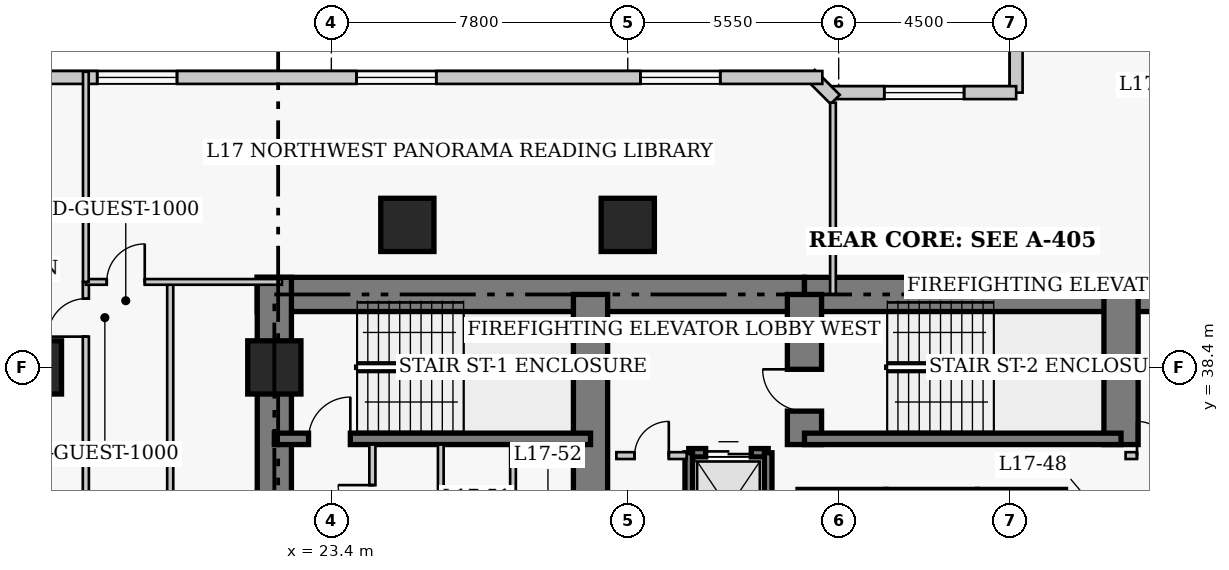
"""IFC4 building model, lengths in metres.
Left out: names, types, materials, properties, quantities, classifications, styles, units other than length and angle.
Written with IfcOpenShell. Run it as: python <this file> out.ifc"""

import sys

from ifc_helpers import new_model, si_unit, direction, frame, frame_2d, origin, origin_2d, place, context, subcontext, project, spatial, rectangle, extrude, element, fill, save


model = new_model("IFC4")
c1 = context("Model", 3, precision=1e-05, world=origin(), true_north=direction((0.0, 1.0)))
c2 = subcontext(c1, "Body", "Model", "MODEL_VIEW")
j1 = project(units=[si_unit("LENGTHUNIT", "METRE"), si_unit("PLANEANGLEUNIT", "RADIAN")], contexts=[c1])
p1 = place(None, origin())
s1 = spatial("IfcSite", under=j1, at=p1, CompositionType="ELEMENT")
p2 = place(p1, origin())
s2 = spatial("IfcBuilding", under=s1, at=p2, CompositionType="ELEMENT")
p3 = place(p2, frame((0.0, 0.0, 71.6)))
s3 = spatial("IfcBuildingStorey", under=s2, at=p3, CompositionType="ELEMENT", Elevation=71.6)
p4 = place(p3, frame((21.45, 40.32, 0.0), z_axis=(0.0, 0.0, 1.0), x_axis=(1.0, 0.0, 0.0)))
e1 = element("IfcWall", 1, at=p4, inside=s3, PredefinedType="SHEAR", context=c2, shape_type="SweptSolid", body=[
    extrude(rectangle(XDim=14.4, YDim=0.9, at=frame_2d((7.2, 0.0))), origin(), (0.0, 0.0, 1.0), 3.8),
])
p5 = place(p3, frame((35.85, 40.32, 0.0), z_axis=(0.0, 0.0, 1.0), x_axis=(1.0, 0.0, 0.0)))
e2 = element("IfcWall", 2, at=p5, inside=s3, PredefinedType="SHEAR", context=c2, shape_type="SweptSolid", body=[
    extrude(rectangle(XDim=12.6, YDim=0.9, at=frame_2d((6.3, 0.0))), origin(), (0.0, 0.0, 1.0), 3.8),
])
p6 = place(p3, frame((21.9, 27.05, 0.0), z_axis=(0.0, 0.0, 1.0), x_axis=(0.0, 1.0, 0.0)))
e3 = element("IfcWall", 3, at=p6, inside=s3, PredefinedType="SHEAR", context=c2, shape_type="SweptSolid", body=[
    extrude(rectangle(XDim=13.72, YDim=0.9, at=frame_2d((6.86, 0.0))), origin(), (0.0, 0.0, 1.0), 3.8),
])
p7 = place(p3, frame((30.22, 33.2, 0.0), z_axis=(0.0, 0.0, 1.0), x_axis=(0.0, 1.0, 0.0)))
e4 = element("IfcWall", 4, at=p7, inside=s3, PredefinedType="SHEAR", context=c2, shape_type="SweptSolid", body=[
    extrude(rectangle(XDim=7.12, YDim=0.9, at=frame_2d((3.56, 0.0))), origin(), (0.0, 0.0, 1.0), 3.8),
])
p8 = place(p3, frame((35.85, 36.37, 0.0), z_axis=(0.0, 0.0, 1.0), x_axis=(0.0, 1.0, 0.0)))
e5 = element("IfcWall", 5, at=p8, inside=s3, PredefinedType="SHEAR", context=c2, shape_type="SweptSolid", body=[
    extrude(rectangle(XDim=3.95, YDim=0.9, at=frame_2d((1.975, 0.0))), origin(), (0.0, 0.0, 1.0), 3.8),
])
p9 = place(p8, frame((0.88, 0.0, 0.0)))
e6 = element("IfcOpeningElement", 6, at=p9, cuts=e5, PredefinedType="OPENING", context=c2, shape_type="SweptSolid", body=[
    extrude(rectangle(XDim=1.1, YDim=2.15, at=frame_2d((0.55, 1.075))), frame((0.0, 0.46, 0.0), z_axis=(0.0, -1.0, 0.0), x_axis=(1.0, 0.0, 0.0)), (0.0, 0.0, 1.0), 0.92),
])
p10 = place(p3, frame((44.18, 36.37, 0.0), z_axis=(0.0, 0.0, 1.0), x_axis=(0.0, 1.0, 0.0)))
e7 = element("IfcWall", 7, at=p10, inside=s3, PredefinedType="SHEAR", context=c2, shape_type="SweptSolid", body=[
    extrude(rectangle(XDim=3.95, YDim=0.9, at=frame_2d((1.975, 0.0))), origin(), (0.0, 0.0, 1.0), 3.8),
])
p11 = place(p3, frame((21.9, 36.52, 0.0), z_axis=(0.0, 0.0, 1.0), x_axis=(1.0, 0.0, 0.0)))
e8 = element("IfcWall", 8, at=p11, inside=s3, PredefinedType="SHEAR", context=c2, shape_type="SweptSolid", body=[
    extrude(rectangle(XDim=8.32, YDim=0.3, at=frame_2d((4.16, 0.0))), origin(), (0.0, 0.0, 1.0), 3.8),
])
p12 = place(p11, frame((0.9, 0.0, 0.0)))
e9 = element("IfcOpeningElement", 9, at=p12, cuts=e8, PredefinedType="OPENING", context=c2, shape_type="SweptSolid", body=[
    extrude(rectangle(XDim=1.1, YDim=2.15, at=frame_2d((0.55, 1.075))), frame((0.0, 0.16, 0.0), z_axis=(0.0, -1.0, 0.0), x_axis=(1.0, 0.0, 0.0)), (0.0, 0.0, 1.0), 0.32),
])
p13 = place(p3, frame((35.85, 36.52, 0.0), z_axis=(0.0, 0.0, 1.0), x_axis=(1.0, 0.0, 0.0)))
e10 = element("IfcWall", 10, at=p13, inside=s3, PredefinedType="SHEAR", context=c2, shape_type="SweptSolid", body=[
    extrude(rectangle(XDim=8.33, YDim=0.3, at=frame_2d((4.165, 0.0))), origin(), (0.0, 0.0, 1.0), 3.8),
])
for number, where, z_axis, x_axis in (
    (11, (15.6, 38.4, 0.0), (0.0, 0.0, 1.0), (1.0, 0.0, 0.0)),
    (12, (21.9, 38.4, 0.0), (0.0, 0.0, 1.0), (1.0, 0.0, 0.0)),
    (13, (25.4, 42.15, 0.0), (0.0, 0.0, 1.0), (1.0, 0.0, 0.0)),
    (14, (31.2, 42.15, 0.0), (0.0, 0.0, 1.0), (1.0, 0.0, 0.0)),
):
    element("IfcColumn", number, at=place(p3, frame(where, z_axis=z_axis, x_axis=x_axis)), inside=s3, PredefinedType="COLUMN", context=c2, shape_type="SweptSolid", body=[
        extrude(rectangle(XDim=1.4, YDim=1.4, at=origin_2d()), origin(), (0.0, 0.0, 1.0), 3.8),
    ])
p14 = place(p3, frame((41.42, 50.97, 0.0), z_axis=(0.0, 0.0, 1.0), x_axis=(0.0, -1.0, 0.0)))
e15 = element("IfcWall", 15, at=p14, inside=s3, PredefinedType="SOLIDWALL", context=c2, shape_type="SweptSolid", body=[
    extrude(rectangle(XDim=5.34, YDim=0.34, at=frame_2d((2.67, 0.0))), origin(), (0.0, 0.0, 1.0), 3.42),
])
p15 = place(p14, frame((1.62, 0.0, 0.85)))
e16 = element("IfcOpeningElement", 16, at=p15, cuts=e15, PredefinedType="OPENING", context=c2, shape_type="SweptSolid", body=[
    extrude(rectangle(XDim=2.1, YDim=1.85, at=frame_2d((1.05, 0.925))), frame((0.0, 0.18, 0.0), z_axis=(0.0, -1.0, 0.0), x_axis=(1.0, 0.0, 0.0)), (0.0, 0.0, 1.0), 0.36),
])
p16 = place(p3, frame((41.42, 45.63, 0.0), z_axis=(0.0, 0.0, 1.0), x_axis=(-1.0, 0.0, 0.0)))
e17 = element("IfcWall", 17, at=p16, inside=s3, PredefinedType="SOLIDWALL", context=c2, shape_type="SweptSolid", body=[
    extrude(rectangle(XDim=4.84, YDim=0.34, at=frame_2d((2.42, 0.0))), origin(), (0.0, 0.0, 1.0), 3.42),
])
p17 = place(p16, frame((1.37, 0.0, 0.85)))
e18 = element("IfcOpeningElement", 18, at=p17, cuts=e17, PredefinedType="OPENING", context=c2, shape_type="SweptSolid", body=[
    extrude(rectangle(XDim=2.1, YDim=1.85, at=frame_2d((1.05, 0.925))), frame((0.0, 0.18, 0.0), z_axis=(0.0, -1.0, 0.0), x_axis=(1.0, 0.0, 0.0)), (0.0, 0.0, 1.0), 0.36),
])
p18 = place(p3, frame((36.658, 45.451, 0.0), z_axis=(0.0, 0.0, 1.0), x_axis=(-0.707106781187, 0.707106781187, 0.0)))
e19 = element("IfcWall", 19, at=p18, inside=s3, PredefinedType="SOLIDWALL", context=c2, shape_type="SweptSolid", body=[
    extrude(rectangle(XDim=0.929, YDim=0.34, at=frame_2d((0.464, 0.0))), origin(), (0.0, 0.0, 1.0), 3.42),
])
p19 = place(p3, frame((36.32, 46.03, 0.0), z_axis=(0.0, 0.0, 1.0), x_axis=(-1.0, 0.0, 0.0)))
e20 = element("IfcWall", 20, at=p19, inside=s3, PredefinedType="SOLIDWALL", context=c2, shape_type="SweptSolid", body=[
    extrude(rectangle(XDim=29.89, YDim=0.34, at=frame_2d((14.945, 0.0))), origin(), (0.0, 0.0, 1.0), 3.42),
])
p20 = place(p19, frame((2.686, 0.0, 0.85)))
e21 = element("IfcOpeningElement", 21, at=p20, cuts=e20, PredefinedType="OPENING", context=c2, shape_type="SweptSolid", body=[
    extrude(rectangle(XDim=2.1, YDim=1.85, at=frame_2d((1.05, 0.925))), frame((0.0, 0.18, 0.0), z_axis=(0.0, -1.0, 0.0), x_axis=(1.0, 0.0, 0.0)), (0.0, 0.0, 1.0), 0.36),
])
p21 = place(p19, frame((10.159, 0.0, 0.85)))
e22 = element("IfcOpeningElement", 22, at=p21, cuts=e20, PredefinedType="OPENING", context=c2, shape_type="SweptSolid", body=[
    extrude(rectangle(XDim=2.1, YDim=1.85, at=frame_2d((1.05, 0.925))), frame((0.0, 0.18, 0.0), z_axis=(0.0, -1.0, 0.0), x_axis=(1.0, 0.0, 0.0)), (0.0, 0.0, 1.0), 0.36),
])
p22 = place(p19, frame((16.981, 0.0, 0.85)))
e23 = element("IfcOpeningElement", 23, at=p22, cuts=e20, PredefinedType="OPENING", context=c2, shape_type="SweptSolid", body=[
    extrude(rectangle(XDim=2.1, YDim=1.85, at=frame_2d((1.05, 0.925))), frame((0.0, 0.18, 0.0), z_axis=(0.0, -1.0, 0.0), x_axis=(1.0, 0.0, 0.0)), (0.0, 0.0, 1.0), 0.36),
])
p23 = place(p19, frame((25.104, 0.0, 0.85)))
e24 = element("IfcOpeningElement", 24, at=p23, cuts=e20, PredefinedType="OPENING", context=c2, shape_type="SweptSolid", body=[
    extrude(rectangle(XDim=2.1, YDim=1.85, at=frame_2d((1.05, 0.925))), frame((0.0, 0.18, 0.0), z_axis=(0.0, -1.0, 0.0), x_axis=(1.0, 0.0, 0.0)), (0.0, 0.0, 1.0), 0.36),
])
p24 = place(p3, frame((35.68, 35.08, 0.0), z_axis=(0.0, 0.0, 1.0), x_axis=(1.0, 0.0, 0.0)))
e25 = element("IfcWall", 25, at=p24, inside=s3, PredefinedType="SHEAR", context=c2, shape_type="SweptSolid", body=[
    extrude(rectangle(XDim=2.32, YDim=0.22, at=frame_2d((1.16, 0.0))), origin(), (0.0, 0.0, 1.0), 3.8),
])
p25 = place(p3, frame((38.0, 35.08, 0.0), z_axis=(0.0, 0.0, 1.0), x_axis=(1.0, 0.0, 0.0)))
e26 = element("IfcWall", 26, at=p25, inside=s3, PredefinedType="SHEAR", context=c2, shape_type="SweptSolid", body=[
    extrude(rectangle(XDim=2.4, YDim=0.22, at=frame_2d((1.2, 0.0))), origin(), (0.0, 0.0, 1.0), 3.8),
])
p26 = place(p3, frame((40.4, 35.08, 0.0), z_axis=(0.0, 0.0, 1.0), x_axis=(1.0, 0.0, 0.0)))
e27 = element("IfcWall", 27, at=p26, inside=s3, PredefinedType="SHEAR", context=c2, shape_type="SweptSolid", body=[
    extrude(rectangle(XDim=2.32, YDim=0.22, at=frame_2d((1.16, 0.0))), origin(), (0.0, 0.0, 1.0), 3.8),
])
p27 = place(p3, frame((32.805, 36.155, 0.0), z_axis=(0.0, 0.0, 1.0), x_axis=(1.0, 0.0, 0.0)))
e28 = element("IfcWall", 28, at=p27, inside=s3, PredefinedType="SHEAR", context=c2, shape_type="SweptSolid", body=[
    extrude(rectangle(XDim=2.09, YDim=0.22, at=frame_2d((1.045, 0.0))), origin(), (0.0, 0.0, 1.0), 3.8),
])
p28 = place(p27, frame((0.445, 0.0, 0.0)))
e29 = element("IfcOpeningElement", 29, at=p28, cuts=e28, PredefinedType="OPENING", context=c2, shape_type="SweptSolid", body=[
    extrude(rectangle(XDim=1.2, YDim=2.15, at=frame_2d((0.6, 1.075))), frame((0.0, 0.12, 0.0), z_axis=(0.0, -1.0, 0.0), x_axis=(1.0, 0.0, 0.0)), (0.0, 0.0, 1.0), 0.24),
])
for number, where, z_axis, x_axis in (
    (30, (32.805, 33.245, 0.0), (0.0, 0.0, 1.0), (0.0, 1.0, 0.0)),
    (31, (34.895, 33.245, 0.0), (0.0, 0.0, 1.0), (0.0, 1.0, 0.0)),
):
    element("IfcWall", number, at=place(p3, frame(where, z_axis=z_axis, x_axis=x_axis)), inside=s3, PredefinedType="SHEAR", context=c2, shape_type="SweptSolid", body=[
        extrude(rectangle(XDim=2.91, YDim=0.2, at=frame_2d((1.455, 0.0))), origin(), (0.0, 0.0, 1.0), 3.8),
    ])
p29 = place(p3, frame((30.9, 36.08, 0.0), z_axis=(0.0, 0.0, 1.0), x_axis=(1.0, 0.0, 0.0)))
e32 = element("IfcWall", 32, at=p29, inside=s3, PredefinedType="PARTITIONING", context=c2, shape_type="SweptSolid", body=[
    extrude(rectangle(XDim=1.85, YDim=0.18, at=frame_2d((0.925, 0.0))), origin(), (0.0, 0.0, 1.0), 3.42),
])
p30 = place(p29, frame((0.48, 0.0, 0.0)))
e33 = element("IfcOpeningElement", 33, at=p30, cuts=e32, PredefinedType="OPENING", context=c2, shape_type="SweptSolid", body=[
    extrude(rectangle(XDim=0.9, YDim=2.15, at=frame_2d((0.45, 1.075))), frame((0.0, 0.1, 0.0), z_axis=(0.0, -1.0, 0.0), x_axis=(1.0, 0.0, 0.0)), (0.0, 0.0, 1.0), 0.2),
])
p31 = place(p3, frame((44.3, 36.08, 0.0), z_axis=(0.0, 0.0, 1.0), x_axis=(1.0, 0.0, 0.0)))
e34 = element("IfcWall", 34, at=p31, inside=s3, PredefinedType="PARTITIONING", context=c2, shape_type="SweptSolid", body=[
    extrude(rectangle(XDim=1.5, YDim=0.18, at=frame_2d((0.75, 0.0))), origin(), (0.0, 0.0, 1.0), 3.42),
])
p32 = place(p31, frame((0.3, 0.0, 0.0)))
e35 = element("IfcOpeningElement", 35, at=p32, cuts=e34, PredefinedType="OPENING", context=c2, shape_type="SweptSolid", body=[
    extrude(rectangle(XDim=0.9, YDim=2.15, at=frame_2d((0.45, 1.075))), frame((0.0, 0.1, 0.0), z_axis=(0.0, -1.0, 0.0), x_axis=(1.0, 0.0, 0.0)), (0.0, 0.0, 1.0), 0.2),
])
p33 = place(p3, frame((24.48, 32.8, 0.0), z_axis=(0.0, 0.0, 1.0), x_axis=(0.0, 1.0, 0.0)))
e36 = element("IfcWall", 36, at=p33, inside=s3, PredefinedType="PARTITIONING", context=c2, shape_type="SweptSolid", body=[
    extrude(rectangle(XDim=3.57, YDim=0.16, at=frame_2d((1.785, 0.0))), origin(), (0.0, 0.0, 1.0), 3.42),
])
p34 = place(p33, frame((1.604, 0.0, 0.0)))
e37 = element("IfcOpeningElement", 37, at=p34, cuts=e36, PredefinedType="OPENING", context=c2, shape_type="SweptSolid", body=[
    extrude(rectangle(XDim=0.9, YDim=2.1, at=frame_2d((0.45, 1.05))), frame((0.0, 0.09, 0.0), z_axis=(0.0, -1.0, 0.0), x_axis=(1.0, 0.0, 0.0)), (0.0, 0.0, 1.0), 0.18),
])
for number, where, z_axis, x_axis in (
    (38, (26.28, 32.75, 0.0), (0.0, 0.0, 1.0), (0.0, 1.0, 0.0)),
    (39, (28.18, 32.75, 0.0), (0.0, 0.0, 1.0), (0.0, 1.0, 0.0)),
):
    element("IfcWall", number, at=place(p3, frame(where, z_axis=z_axis, x_axis=x_axis)), inside=s3, PredefinedType="PARTITIONING", context=c2, shape_type="SweptSolid", body=[
        extrude(rectangle(XDim=3.62, YDim=0.15, at=frame_2d((1.81, 0.0))), origin(), (0.0, 0.0, 1.0), 3.42),
    ])
p35 = place(p3, frame((16.94, 5.05, 0.0), z_axis=(0.0, 0.0, 1.0), x_axis=(0.0, 1.0, 0.0)))
e40 = element("IfcWall", 40, at=p35, inside=s3, PredefinedType="PARTITIONING", context=c2, shape_type="SweptSolid", body=[
    extrude(rectangle(XDim=35.6, YDim=0.16, at=frame_2d((17.8, 0.0))), origin(), (0.0, 0.0, 1.0), 3.42),
])
p36 = place(p35, frame((2.6, 0.0, 0.0)))
e41 = element("IfcOpeningElement", 41, at=p36, cuts=e40, PredefinedType="OPENING", context=c2, shape_type="SweptSolid", body=[
    extrude(rectangle(XDim=0.95, YDim=2.1, at=frame_2d((0.475, 1.05))), frame((0.0, 0.09, 0.0), z_axis=(0.0, -1.0, 0.0), x_axis=(1.0, 0.0, 0.0)), (0.0, 0.0, 1.0), 0.18),
])
p37 = place(p35, frame((10.075, 0.0, 0.0)))
e42 = element("IfcOpeningElement", 42, at=p37, cuts=e40, PredefinedType="OPENING", context=c2, shape_type="SweptSolid", body=[
    extrude(rectangle(XDim=0.95, YDim=2.1, at=frame_2d((0.475, 1.05))), frame((0.0, 0.09, 0.0), z_axis=(0.0, -1.0, 0.0), x_axis=(1.0, 0.0, 0.0)), (0.0, 0.0, 1.0), 0.18),
])
p38 = place(p35, frame((18.875, 0.0, 0.0)))
e43 = element("IfcOpeningElement", 43, at=p38, cuts=e40, PredefinedType="OPENING", context=c2, shape_type="SweptSolid", body=[
    extrude(rectangle(XDim=0.95, YDim=2.1, at=frame_2d((0.475, 1.05))), frame((0.0, 0.09, 0.0), z_axis=(0.0, -1.0, 0.0), x_axis=(1.0, 0.0, 0.0)), (0.0, 0.0, 1.0), 0.18),
])
p39 = place(p35, frame((26.925, 0.0, 0.0)))
e44 = element("IfcOpeningElement", 44, at=p39, cuts=e40, PredefinedType="OPENING", context=c2, shape_type="SweptSolid", body=[
    extrude(rectangle(XDim=0.95, YDim=2.1, at=frame_2d((0.475, 1.05))), frame((0.0, 0.09, 0.0), z_axis=(0.0, -1.0, 0.0), x_axis=(1.0, 0.0, 0.0)), (0.0, 0.0, 1.0), 0.18),
])
p40 = place(p35, frame((34.16, 0.0, 0.0)))
e45 = element("IfcOpeningElement", 45, at=p40, cuts=e40, PredefinedType="OPENING", context=c2, shape_type="SweptSolid", body=[
    extrude(rectangle(XDim=1.0, YDim=2.15, at=frame_2d((0.5, 1.075))), frame((0.0, 0.09, 0.0), z_axis=(0.0, -1.0, 0.0), x_axis=(1.0, 0.0, 0.0)), (0.0, 0.0, 1.0), 0.18),
])
p41 = place(p3, frame((19.16, 35.02, 0.0), z_axis=(0.0, 0.0, 1.0), x_axis=(0.0, 1.0, 0.0)))
e46 = element("IfcWall", 46, at=p41, inside=s3, PredefinedType="PARTITIONING", context=c2, shape_type="SweptSolid", body=[
    extrude(rectangle(XDim=5.63, YDim=0.16, at=frame_2d((2.815, 0.0))), origin(), (0.0, 0.0, 1.0), 3.42),
])
p42 = place(p3, frame((16.94, 40.65, 0.0), z_axis=(0.0, 0.0, 1.0), x_axis=(1.0, 0.0, 0.0)))
e47 = element("IfcWall", 47, at=p42, inside=s3, PredefinedType="PARTITIONING", context=c2, shape_type="SweptSolid", body=[
    extrude(rectangle(XDim=5.16, YDim=0.15, at=frame_2d((2.58, 0.0))), origin(), (0.0, 0.0, 1.0), 3.42),
])
p43 = place(p42, frame((0.55, 0.0, 0.0)))
e48 = element("IfcOpeningElement", 48, at=p43, cuts=e47, PredefinedType="OPENING", context=c2, shape_type="SweptSolid", body=[
    extrude(rectangle(XDim=1.0, YDim=2.15, at=frame_2d((0.5, 1.075))), frame((0.0, 0.085, 0.0), z_axis=(0.0, -1.0, 0.0), x_axis=(1.0, 0.0, 0.0)), (0.0, 0.0, 1.0), 0.17),
])
p44 = place(p3, frame((16.94, 40.65, 0.0), z_axis=(0.0, 0.0, 1.0), x_axis=(0.0, 1.0, 0.0)))
e49 = element("IfcWall", 49, at=p44, inside=s3, PredefinedType="PARTITIONING", context=c2, shape_type="SweptSolid", body=[
    extrude(rectangle(XDim=5.53, YDim=0.15, at=frame_2d((2.765, 0.0))), origin(), (0.0, 0.0, 1.0), 3.42),
])
p45 = place(p3, frame((36.6, 40.32, 0.0), z_axis=(0.0, 0.0, 1.0), x_axis=(0.0, 1.0, 0.0)))
e50 = element("IfcWall", 50, at=p45, inside=s3, PredefinedType="PARTITIONING", context=c2, shape_type="SweptSolid", body=[
    extrude(rectangle(XDim=5.045, YDim=0.15, at=frame_2d((2.522, 0.0))), origin(), (0.0, 0.0, 1.0), 3.42),
])
p46 = place(p3, frame((14.45, 36.1, 0.0), z_axis=(0.0, 0.0, 1.0), x_axis=(1.0, 0.0, 0.0)))
e51 = element("IfcWall", 51, at=p46, inside=s3, PredefinedType="PARTITIONING", context=c2, shape_type="SweptSolid", body=[
    extrude(rectangle(XDim=2.49, YDim=0.15, at=frame_2d((1.245, 0.0))), origin(), (0.0, 0.0, 1.0), 3.42),
])
p47 = place(p17, origin())
e52 = element("IfcWindow", 52, at=p47, inside=s3, PartitioningType="SINGLE_PANEL", PredefinedType="WINDOW", context=c2, shape_type="SweptSolid", body=[
    extrude(rectangle(XDim=2.1, YDim=1.85, at=frame_2d((1.05, 0.925))), frame((0.0, 0.03, 0.0), z_axis=(0.0, -1.0, 0.0), x_axis=(1.0, 0.0, 0.0)), (0.0, 0.0, 1.0), 0.06),
])
fill(e18, e52)
p48 = place(p20, origin())
e53 = element("IfcWindow", 53, at=p48, inside=s3, PartitioningType="SINGLE_PANEL", PredefinedType="WINDOW", context=c2, shape_type="SweptSolid", body=[
    extrude(rectangle(XDim=2.1, YDim=1.85, at=frame_2d((1.05, 0.925))), frame((0.0, 0.03, 0.0), z_axis=(0.0, -1.0, 0.0), x_axis=(1.0, 0.0, 0.0)), (0.0, 0.0, 1.0), 0.06),
])
fill(e21, e53)
p49 = place(p21, origin())
e54 = element("IfcWindow", 54, at=p49, inside=s3, PartitioningType="SINGLE_PANEL", PredefinedType="WINDOW", context=c2, shape_type="SweptSolid", body=[
    extrude(rectangle(XDim=2.1, YDim=1.85, at=frame_2d((1.05, 0.925))), frame((0.0, 0.03, 0.0), z_axis=(0.0, -1.0, 0.0), x_axis=(1.0, 0.0, 0.0)), (0.0, 0.0, 1.0), 0.06),
])
fill(e22, e54)
p50 = place(p22, origin())
e55 = element("IfcWindow", 55, at=p50, inside=s3, PartitioningType="SINGLE_PANEL", PredefinedType="WINDOW", context=c2, shape_type="SweptSolid", body=[
    extrude(rectangle(XDim=2.1, YDim=1.85, at=frame_2d((1.05, 0.925))), frame((0.0, 0.03, 0.0), z_axis=(0.0, -1.0, 0.0), x_axis=(1.0, 0.0, 0.0)), (0.0, 0.0, 1.0), 0.06),
])
fill(e23, e55)
p51 = place(p28, origin())
e56 = element("IfcDoor", 56, at=p51, inside=s3, OperationType="DOUBLE_DOOR_SLIDING", PredefinedType="DOOR", context=c2, shape_type="SweptSolid", body=[
    extrude(rectangle(XDim=1.2, YDim=2.15, at=frame_2d((0.6, 1.075))), frame((0.0, 0.025, 0.0), z_axis=(0.0, -1.0, 0.0), x_axis=(1.0, 0.0, 0.0)), (0.0, 0.0, 1.0), 0.05),
])
fill(e29, e56)
p52 = place(p30, origin())
e57 = element("IfcDoor", 57, at=p52, inside=s3, OperationType="SINGLE_SWING_RIGHT", PredefinedType="DOOR", context=c2, shape_type="SweptSolid", body=[
    extrude(rectangle(XDim=0.9, YDim=2.15, at=frame_2d((0.45, 1.075))), frame((0.0, 0.025, 0.0), z_axis=(0.0, -1.0, 0.0), x_axis=(1.0, 0.0, 0.0)), (0.0, 0.0, 1.0), 0.05),
])
fill(e33, e57)
p53 = place(p32, origin())
e58 = element("IfcDoor", 58, at=p53, inside=s3, OperationType="SINGLE_SWING_LEFT", PredefinedType="DOOR", context=c2, shape_type="SweptSolid", body=[
    extrude(rectangle(XDim=0.9, YDim=2.15, at=frame_2d((0.45, 1.075))), frame((0.0, 0.025, 0.0), z_axis=(0.0, -1.0, 0.0), x_axis=(1.0, 0.0, 0.0)), (0.0, 0.0, 1.0), 0.05),
])
fill(e35, e58)
p54 = place(p34, origin())
e59 = element("IfcDoor", 59, at=p54, inside=s3, OperationType="SINGLE_SWING_RIGHT", PredefinedType="DOOR", context=c2, shape_type="SweptSolid", body=[
    extrude(rectangle(XDim=0.9, YDim=2.1, at=frame_2d((0.45, 1.05))), frame((0.0, 0.025, 0.0), z_axis=(0.0, -1.0, 0.0), x_axis=(1.0, 0.0, 0.0)), (0.0, 0.0, 1.0), 0.05),
])
fill(e37, e59)
p55 = place(p43, origin())
e60 = element("IfcDoor", 60, at=p55, inside=s3, OperationType="SINGLE_SWING_RIGHT", PredefinedType="DOOR", context=c2, shape_type="SweptSolid", body=[
    extrude(rectangle(XDim=1.0, YDim=2.15, at=frame_2d((0.5, 1.075))), frame((0.0, 0.025, 0.0), z_axis=(0.0, -1.0, 0.0), x_axis=(1.0, 0.0, 0.0)), (0.0, 0.0, 1.0), 0.05),
])
fill(e48, e60)
p56 = place(p40, origin())
e61 = element("IfcDoor", 61, at=p56, inside=s3, OperationType="SINGLE_SWING_LEFT", PredefinedType="DOOR", context=c2, shape_type="SweptSolid", body=[
    extrude(rectangle(XDim=1.0, YDim=2.15, at=frame_2d((0.5, 1.075))), frame((0.0, 0.025, 0.0), z_axis=(0.0, -1.0, 0.0), x_axis=(1.0, 0.0, 0.0)), (0.0, 0.0, 1.0), 0.05),
])
fill(e45, e61)
p57 = place(p12, origin())
e62 = element("IfcDoor", 62, at=p57, inside=s3, OperationType="SINGLE_SWING_RIGHT", PredefinedType="DOOR", context=c2, shape_type="SweptSolid", body=[
    extrude(rectangle(XDim=1.1, YDim=2.15, at=frame_2d((0.55, 1.075))), frame((0.0, 0.025, 0.0), z_axis=(0.0, -1.0, 0.0), x_axis=(1.0, 0.0, 0.0)), (0.0, 0.0, 1.0), 0.05),
])
fill(e9, e62)
p58 = place(p9, origin())
e63 = element("IfcDoor", 63, at=p58, inside=s3, OperationType="SINGLE_SWING_RIGHT", PredefinedType="DOOR", context=c2, shape_type="SweptSolid", body=[
    extrude(rectangle(XDim=1.1, YDim=2.15, at=frame_2d((0.55, 1.075))), frame((0.0, 0.025, 0.0), z_axis=(0.0, -1.0, 0.0), x_axis=(1.0, 0.0, 0.0)), (0.0, 0.0, 1.0), 0.05),
])
fill(e6, e63)
save(model, sys.argv[1])
